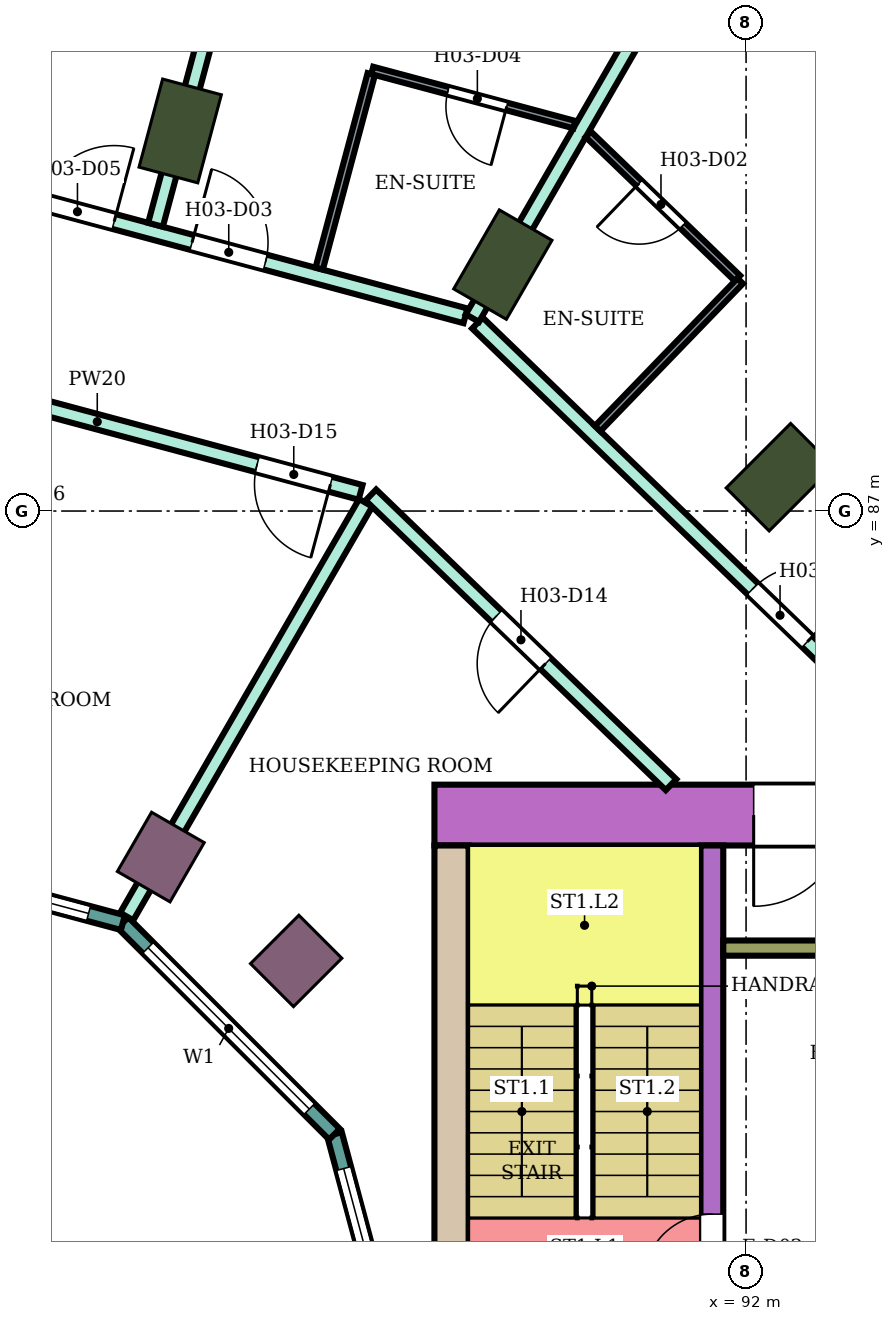
"""IFC4 building model, lengths in metres.
Left out: names, types, materials, properties, quantities, classifications, styles, units other than length and angle.
Written with IfcOpenShell. Run it as: python <this file> out.ifc"""

import sys

from ifc_helpers import new_model, si_unit, direction, frame, frame_2d, origin, origin_2d, place, context, subcontext, project, spatial, rectangle, extrude, element, fill, save


model = new_model("IFC4")
c1 = context("Model", 3, precision=1e-05, world=origin(), true_north=direction((0.0, 1.0)))
c2 = subcontext(c1, "Body", "Model", "MODEL_VIEW")
j1 = project(units=[si_unit("LENGTHUNIT", "METRE"), si_unit("PLANEANGLEUNIT", "RADIAN")], contexts=[c1])
p1 = place(None, origin())
s1 = spatial("IfcSite", under=j1, at=p1, CompositionType="ELEMENT")
p2 = place(p1, origin())
s2 = spatial("IfcBuilding", under=s1, at=p2, CompositionType="ELEMENT")
p3 = place(p2, frame((0.0, 0.0, 51.6)))
s3 = spatial("IfcBuildingStorey", under=s2, at=p3, CompositionType="ELEMENT", Elevation=51.6)
for number, where, z_axis, x_axis in (
    (1, (92.445, 87.445, 0.0), (0.0, 0.0, 1.0), (0.707, 0.707, 0.0)),
    (2, (88.8, 90.242, 0.0), (0.0, 0.0, 1.0), (0.5, 0.866, 0.0)),
    (3, (84.555, 92.0, 0.0), (0.0, 0.0, 1.0), (0.259, 0.966, 0.0)),
):
    element("IfcColumn", number, at=place(p3, frame(where, z_axis=z_axis, x_axis=x_axis)), inside=s3, PredefinedType="COLUMN", context=c2, shape_type="SweptSolid", body=[
        extrude(rectangle(XDim=1.2, YDim=0.8, at=origin_2d()), origin(), (0.0, 0.0, 1.0), 3.8),
    ])
for number, where, z_axis, x_axis in (
    (4, (86.081, 81.081, 0.0), (0.0, 0.0, 1.0), (0.707, 0.707, 0.0)),
    (5, (84.3, 82.448, 0.0), (0.0, 0.0, 1.0), (0.5, 0.866, 0.0)),
):
    element("IfcColumn", number, at=place(p3, frame(where, z_axis=z_axis, x_axis=x_axis)), inside=s3, PredefinedType="COLUMN", context=c2, shape_type="SweptSolid", body=[
        extrude(rectangle(XDim=0.9, YDim=0.8, at=origin_2d()), origin(), (0.0, 0.0, 1.0), 3.8),
    ])
p4 = place(p3, frame((87.9, 83.0, 0.0), z_axis=(0.0, 0.0, 1.0), x_axis=(1.0, 0.0, 0.0)))
e6 = element("IfcWall", 6, at=p4, inside=s3, PredefinedType="SHEAR", context=c2, shape_type="SweptSolid", body=[
    extrude(rectangle(XDim=14.7, YDim=0.8, at=frame_2d((7.35, 0.0))), origin(), (0.0, 0.0, 1.0), 3.48),
])
p5 = place(p4, frame((4.2, 0.0, 0.0)))
e7 = element("IfcOpeningElement", 7, at=p5, cuts=e6, PredefinedType="OPENING", context=c2, shape_type="SweptSolid", body=[
    extrude(rectangle(XDim=2.4, YDim=2.4, at=frame_2d((1.2, 1.2))), frame((0.0, 0.41, 0.0), z_axis=(0.0, -1.0, 0.0), x_axis=(1.0, 0.0, 0.0)), (0.0, 0.0, 1.0), 0.82),
])
p6 = place(p3, frame((88.125, 75.0, 0.0), z_axis=(0.0, 0.0, 1.0), x_axis=(0.0, 1.0, 0.0)))
e8 = element("IfcWall", 8, at=p6, inside=s3, PredefinedType="SHEAR", context=c2, shape_type="SweptSolid", body=[
    extrude(rectangle(XDim=7.6, YDim=0.45, at=frame_2d((3.8, 0.0))), origin(), (0.0, 0.0, 1.0), 3.48),
])
p7 = place(p3, frame((91.55, 75.0, 0.0), z_axis=(0.0, 0.0, 1.0), x_axis=(0.0, 1.0, 0.0)))
e9 = element("IfcWall", 9, at=p7, inside=s3, PredefinedType="SHEAR", context=c2, shape_type="SweptSolid", body=[
    extrude(rectangle(XDim=7.6, YDim=0.3, at=frame_2d((3.8, 0.0))), origin(), (0.0, 0.0, 1.0), 3.48),
])
p8 = place(p7, frame((1.85, 0.0, 0.0)))
e10 = element("IfcOpeningElement", 10, at=p8, cuts=e9, PredefinedType="OPENING", context=c2, shape_type="SweptSolid", body=[
    extrude(rectangle(XDim=0.9, YDim=2.1, at=frame_2d((0.45, 1.05))), frame((0.0, 0.16, 0.0), z_axis=(0.0, -1.0, 0.0), x_axis=(1.0, 0.0, 0.0)), (0.0, 0.0, 1.0), 0.32),
])
p9 = place(p3, frame((91.7, 81.25, 0.0), z_axis=(0.0, 0.0, 1.0), x_axis=(1.0, 0.0, 0.0)))
e11 = element("IfcWall", 11, at=p9, inside=s3, PredefinedType="SHEAR", context=c2, shape_type="SweptSolid", body=[
    extrude(rectangle(XDim=4.65, YDim=0.2, at=frame_2d((2.325, 0.0))), origin(), (0.0, 0.0, 1.0), 3.48),
])
p10 = place(p3, frame((87.604, 75.0, 0.0), z_axis=(0.0, 0.0, 1.0), x_axis=(-0.258789828301, 0.965933654434, 0.0)))
e12 = element("IfcWall", 12, at=p10, inside=s3, PredefinedType="NOTDEFINED", context=c2, shape_type="SweptSolid", body=[
    extrude(rectangle(XDim=3.936, YDim=0.2, at=frame_2d((1.968, 0.0))), origin(), (0.0, 0.0, 1.0), 3.8),
])
p11 = place(p10, frame((0.468, 0.0, 0.9)))
e13 = element("IfcOpeningElement", 13, at=p11, cuts=e12, PredefinedType="OPENING", context=c2, shape_type="SweptSolid", body=[
    extrude(rectangle(XDim=3.0, YDim=2.3, at=frame_2d((1.5, 1.15))), frame((0.0, 0.11, 0.0), z_axis=(0.0, -1.0, 0.0), x_axis=(1.0, 0.0, 0.0)), (0.0, 0.0, 1.0), 0.22),
])
p12 = place(p3, frame((86.585, 78.802, 0.0), z_axis=(0.0, 0.0, 1.0), x_axis=(-0.707106781187, 0.707106781187, 0.0)))
e14 = element("IfcWall", 14, at=p12, inside=s3, PredefinedType="NOTDEFINED", context=c2, shape_type="SweptSolid", body=[
    extrude(rectangle(XDim=3.936, YDim=0.2, at=frame_2d((1.968, 0.0))), origin(), (0.0, 0.0, 1.0), 3.8),
])
p13 = place(p12, frame((0.468, 0.0, 0.9)))
e15 = element("IfcOpeningElement", 15, at=p13, cuts=e14, PredefinedType="OPENING", context=c2, shape_type="SweptSolid", body=[
    extrude(rectangle(XDim=3.0, YDim=2.3, at=frame_2d((1.5, 1.15))), frame((0.0, 0.11, 0.0), z_axis=(0.0, -1.0, 0.0), x_axis=(1.0, 0.0, 0.0)), (0.0, 0.0, 1.0), 0.22),
])
p14 = place(p3, frame((83.802, 81.585, 0.0), z_axis=(0.0, 0.0, 1.0), x_axis=(-0.965933654434, 0.258789828301, 0.0)))
e16 = element("IfcWall", 16, at=p14, inside=s3, PredefinedType="NOTDEFINED", context=c2, shape_type="SweptSolid", body=[
    extrude(rectangle(XDim=3.936, YDim=0.2, at=frame_2d((1.968, 0.0))), origin(), (0.0, 0.0, 1.0), 3.8),
])
p15 = place(p14, frame((0.468, 0.0, 0.9)))
e17 = element("IfcOpeningElement", 17, at=p15, cuts=e16, PredefinedType="OPENING", context=c2, shape_type="SweptSolid", body=[
    extrude(rectangle(XDim=3.0, YDim=2.3, at=frame_2d((1.5, 1.15))), frame((0.0, 0.11, 0.0), z_axis=(0.0, -1.0, 0.0), x_axis=(1.0, 0.0, 0.0)), (0.0, 0.0, 1.0), 0.22),
])
p16 = place(p3, frame((80.0, 89.104, 0.0), z_axis=(0.0, 0.0, 1.0), x_axis=(0.965856548257, -0.259077455964, 0.0)))
e18 = element("IfcWall", 18, at=p16, inside=s3, PredefinedType="PARTITIONING", context=c2, shape_type="SweptSolid", body=[
    extrude(rectangle(XDim=7.173, YDim=0.2, at=frame_2d((3.586, 0.0))), origin(), (0.0, 0.0, 1.0), 3.35),
])
p17 = place(p16, frame((5.763, 0.0, 0.0)))
e19 = element("IfcOpeningElement", 19, at=p17, cuts=e18, PredefinedType="OPENING", context=c2, shape_type="SweptSolid", body=[
    extrude(rectangle(XDim=1.0, YDim=2.1, at=frame_2d((0.5, 1.05))), frame((0.0, 0.11, 0.0), z_axis=(0.0, -1.0, 0.0), x_axis=(1.0, 0.0, 0.0)), (0.0, 0.0, 1.0), 0.22),
])
p18 = place(p3, frame((80.0, 91.797, 0.0), z_axis=(0.0, 0.0, 1.0), x_axis=(0.965857042792, -0.259075612301, 0.0)))
e20 = element("IfcWall", 20, at=p18, inside=s3, PredefinedType="PARTITIONING", context=c2, shape_type="SweptSolid", body=[
    extrude(rectangle(XDim=8.602, YDim=0.2, at=frame_2d((4.301, 0.0))), origin(), (0.0, 0.0, 1.0), 3.35),
])
p19 = place(p18, frame((4.877, 0.0, 0.0)))
e21 = element("IfcOpeningElement", 21, at=p19, cuts=e20, PredefinedType="OPENING", context=c2, shape_type="SweptSolid", body=[
    extrude(rectangle(XDim=1.0, YDim=2.1, at=frame_2d((0.5, 1.05))), frame((0.0, 0.11, 0.0), z_axis=(0.0, -1.0, 0.0), x_axis=(1.0, 0.0, 0.0)), (0.0, 0.0, 1.0), 0.22),
])
p20 = place(p18, frame((2.817, 0.0, 0.0)))
e22 = element("IfcOpeningElement", 22, at=p20, cuts=e20, PredefinedType="OPENING", context=c2, shape_type="SweptSolid", body=[
    extrude(rectangle(XDim=1.0, YDim=2.1, at=frame_2d((0.5, 1.05))), frame((0.0, 0.11, 0.0), z_axis=(0.0, -1.0, 0.0), x_axis=(1.0, 0.0, 0.0)), (0.0, 0.0, 1.0), 0.22),
])
p21 = place(p3, frame((83.851, 81.666, 0.0), z_axis=(0.0, 0.0, 1.0), x_axis=(0.500253653624, 0.865878907259, 0.0)))
e23 = element("IfcWall", 23, at=p21, inside=s3, PredefinedType="PARTITIONING", context=c2, shape_type="SweptSolid", body=[
    extrude(rectangle(XDim=6.285, YDim=0.2, at=frame_2d((3.143, 0.0))), origin(), (0.0, 0.0, 1.0), 3.35),
])
p22 = place(p3, frame((84.23, 90.766, 0.0), z_axis=(0.0, 0.0, 1.0), x_axis=(0.258967920341, 0.965885922992, 0.0)))
e24 = element("IfcWall", 24, at=p22, inside=s3, PredefinedType="PARTITIONING", context=c2, shape_type="SweptSolid", body=[
    extrude(rectangle(XDim=9.475, YDim=0.2, at=frame_2d((4.737, 0.0))), origin(), (0.0, 0.0, 1.0), 3.35),
])
p23 = place(p3, frame((87.064, 87.211, 0.0), z_axis=(0.0, 0.0, 1.0), x_axis=(0.719562412484, -0.694427774891, 0.0)))
e25 = element("IfcWall", 25, at=p23, inside=s3, PredefinedType="PARTITIONING", context=c2, shape_type="SweptSolid", body=[
    extrude(rectangle(XDim=5.488, YDim=0.2, at=frame_2d((2.744, 0.0))), origin(), (0.0, 0.0, 1.0), 3.35),
])
p24 = place(p23, frame((2.294, 0.0, 0.0)))
e26 = element("IfcOpeningElement", 26, at=p24, cuts=e25, PredefinedType="OPENING", context=c2, shape_type="SweptSolid", body=[
    extrude(rectangle(XDim=0.9, YDim=2.1, at=frame_2d((0.45, 1.05))), frame((0.0, 0.11, 0.0), z_axis=(0.0, -1.0, 0.0), x_axis=(1.0, 0.0, 0.0)), (0.0, 0.0, 1.0), 0.22),
])
p25 = place(p3, frame((88.466, 89.473, 0.0), z_axis=(0.0, 0.0, 1.0), x_axis=(0.719346014649, -0.694651935295, 0.0)))
e27 = element("IfcWall", 27, at=p25, inside=s3, PredefinedType="PARTITIONING", context=c2, shape_type="SweptSolid", body=[
    extrude(rectangle(XDim=6.525, YDim=0.2, at=frame_2d((3.263, 0.0))), origin(), (0.0, 0.0, 1.0), 3.35),
])
p26 = place(p25, frame((5.034, 0.0, 0.0)))
e28 = element("IfcOpeningElement", 28, at=p26, cuts=e27, PredefinedType="OPENING", context=c2, shape_type="SweptSolid", body=[
    extrude(rectangle(XDim=1.0, YDim=2.1, at=frame_2d((0.5, 1.05))), frame((0.0, 0.11, 0.0), z_axis=(0.0, -1.0, 0.0), x_axis=(1.0, 0.0, 0.0)), (0.0, 0.0, 1.0), 0.22),
])
p27 = place(p3, frame((88.399, 89.538, 0.0), z_axis=(0.0, 0.0, 1.0), x_axis=(0.500249596464, 0.865881251233, 0.0)))
e29 = element("IfcWall", 29, at=p27, inside=s3, PredefinedType="PARTITIONING", context=c2, shape_type="SweptSolid", body=[
    extrude(rectangle(XDim=9.006, YDim=0.2, at=frame_2d((4.503, 0.0))), origin(), (0.0, 0.0, 1.0), 3.35),
])
p28 = place(p3, frame((86.384, 90.19, 0.0), z_axis=(0.0, 0.0, 1.0), x_axis=(0.258677737588, 0.965963678446, 0.0)))
e30 = element("IfcWall", 30, at=p28, inside=s3, PredefinedType="PARTITIONING", context=c2, shape_type="SweptSolid", body=[
    extrude(rectangle(XDim=2.649, YDim=0.1, at=frame_2d((1.325, 0.0))), origin(), (0.0, 0.0, 1.0), 3.35),
])
p29 = place(p3, frame((87.082, 92.797, 0.0), z_axis=(0.0, 0.0, 1.0), x_axis=(0.965892621415, -0.258942935598, 0.0)))
e31 = element("IfcWall", 31, at=p29, inside=s3, PredefinedType="PARTITIONING", context=c2, shape_type="SweptSolid", body=[
    extrude(rectangle(XDim=2.753, YDim=0.1, at=frame_2d((1.376, 0.0))), origin(), (0.0, 0.0, 1.0), 3.35),
])
p30 = place(p29, frame((1.032, 0.0, 0.0)))
e32 = element("IfcOpeningElement", 32, at=p30, cuts=e31, PredefinedType="OPENING", context=c2, shape_type="SweptSolid", body=[
    extrude(rectangle(XDim=0.8, YDim=2.1, at=frame_2d((0.4, 1.05))), frame((0.0, 0.06, 0.0), z_axis=(0.0, -1.0, 0.0), x_axis=(1.0, 0.0, 0.0)), (0.0, 0.0, 1.0), 0.12),
])
p31 = place(p3, frame((89.925, 91.956, 0.0), z_axis=(0.0, 0.0, 1.0), x_axis=(0.719395291255, -0.694600903339, 0.0)))
e33 = element("IfcWall", 33, at=p31, inside=s3, PredefinedType="PARTITIONING", context=c2, shape_type="SweptSolid", body=[
    extrude(rectangle(XDim=2.728, YDim=0.1, at=frame_2d((1.364, 0.0))), origin(), (0.0, 0.0, 1.0), 3.35),
])
p32 = place(p31, frame((0.928, 0.0, 0.0)))
e34 = element("IfcOpeningElement", 34, at=p32, cuts=e33, PredefinedType="OPENING", context=c2, shape_type="SweptSolid", body=[
    extrude(rectangle(XDim=0.8, YDim=2.1, at=frame_2d((0.4, 1.05))), frame((0.0, 0.06, 0.0), z_axis=(0.0, -1.0, 0.0), x_axis=(1.0, 0.0, 0.0)), (0.0, 0.0, 1.0), 0.12),
])
p33 = place(p3, frame((90.048, 88.085, 0.0), z_axis=(0.0, 0.0, 1.0), x_axis=(0.694655834207, 0.71934224956, 0.0)))
e35 = element("IfcWall", 35, at=p33, inside=s3, PredefinedType="PARTITIONING", context=c2, shape_type="SweptSolid", body=[
    extrude(rectangle(XDim=2.7, YDim=0.1, at=frame_2d((1.35, 0.0))), origin(), (0.0, 0.0, 1.0), 3.35),
])
p34 = place(p11, origin())
e36 = element("IfcWindow", 36, at=p34, inside=s3, PartitioningType="SINGLE_PANEL", PredefinedType="WINDOW", context=c2, shape_type="SweptSolid", body=[
    extrude(rectangle(XDim=3.0, YDim=2.3, at=frame_2d((1.5, 1.15))), frame((0.0, 0.03, 0.0), z_axis=(0.0, -1.0, 0.0), x_axis=(1.0, 0.0, 0.0)), (0.0, 0.0, 1.0), 0.06),
])
fill(e13, e36)
p35 = place(p13, origin())
e37 = element("IfcWindow", 37, at=p35, inside=s3, PartitioningType="SINGLE_PANEL", PredefinedType="WINDOW", context=c2, shape_type="SweptSolid", body=[
    extrude(rectangle(XDim=3.0, YDim=2.3, at=frame_2d((1.5, 1.15))), frame((0.0, 0.03, 0.0), z_axis=(0.0, -1.0, 0.0), x_axis=(1.0, 0.0, 0.0)), (0.0, 0.0, 1.0), 0.06),
])
fill(e15, e37)
p36 = place(p15, origin())
e38 = element("IfcWindow", 38, at=p36, inside=s3, PartitioningType="SINGLE_PANEL", PredefinedType="WINDOW", context=c2, shape_type="SweptSolid", body=[
    extrude(rectangle(XDim=3.0, YDim=2.3, at=frame_2d((1.5, 1.15))), frame((0.0, 0.03, 0.0), z_axis=(0.0, -1.0, 0.0), x_axis=(1.0, 0.0, 0.0)), (0.0, 0.0, 1.0), 0.06),
])
fill(e17, e38)
p37 = place(p26, origin())
e39 = element("IfcDoor", 39, at=p37, inside=s3, OperationType="SINGLE_SWING_RIGHT", PredefinedType="DOOR", context=c2, shape_type="SweptSolid", body=[
    extrude(rectangle(XDim=1.0, YDim=2.1, at=frame_2d((0.5, 1.05))), frame((0.0, 0.025, 0.0), z_axis=(0.0, -1.0, 0.0), x_axis=(1.0, 0.0, 0.0)), (0.0, 0.0, 1.0), 0.05),
])
fill(e28, e39)
p38 = place(p32, frame((0.8, 0.0, 0.0), z_axis=(0.0, 0.0, 1.0), x_axis=(-1.0, 0.0, 0.0)))
e40 = element("IfcDoor", 40, at=p38, inside=s3, OperationType="SINGLE_SWING_RIGHT", PredefinedType="DOOR", context=c2, shape_type="SweptSolid", body=[
    extrude(rectangle(XDim=0.8, YDim=2.1, at=frame_2d((0.4, 1.05))), frame((0.0, 0.025, 0.0), z_axis=(0.0, -1.0, 0.0), x_axis=(1.0, 0.0, 0.0)), (0.0, 0.0, 1.0), 0.05),
])
fill(e34, e40)
p39 = place(p19, origin())
e41 = element("IfcDoor", 41, at=p39, inside=s3, OperationType="SINGLE_SWING_LEFT", PredefinedType="DOOR", context=c2, shape_type="SweptSolid", body=[
    extrude(rectangle(XDim=1.0, YDim=2.1, at=frame_2d((0.5, 1.05))), frame((0.0, 0.025, 0.0), z_axis=(0.0, -1.0, 0.0), x_axis=(1.0, 0.0, 0.0)), (0.0, 0.0, 1.0), 0.05),
])
fill(e21, e41)
p40 = place(p30, frame((0.8, 0.0, 0.0), z_axis=(0.0, 0.0, 1.0), x_axis=(-1.0, 0.0, 0.0)))
e42 = element("IfcDoor", 42, at=p40, inside=s3, OperationType="SINGLE_SWING_LEFT", PredefinedType="DOOR", context=c2, shape_type="SweptSolid", body=[
    extrude(rectangle(XDim=0.8, YDim=2.1, at=frame_2d((0.4, 1.05))), frame((0.0, 0.025, 0.0), z_axis=(0.0, -1.0, 0.0), x_axis=(1.0, 0.0, 0.0)), (0.0, 0.0, 1.0), 0.05),
])
fill(e32, e42)
p41 = place(p20, origin())
e43 = element("IfcDoor", 43, at=p41, inside=s3, OperationType="SINGLE_SWING_RIGHT", PredefinedType="DOOR", context=c2, shape_type="SweptSolid", body=[
    extrude(rectangle(XDim=1.0, YDim=2.1, at=frame_2d((0.5, 1.05))), frame((0.0, 0.025, 0.0), z_axis=(0.0, -1.0, 0.0), x_axis=(1.0, 0.0, 0.0)), (0.0, 0.0, 1.0), 0.05),
])
fill(e22, e43)
p42 = place(p24, frame((0.9, 0.0, 0.0), z_axis=(0.0, 0.0, 1.0), x_axis=(-1.0, 0.0, 0.0)))
e44 = element("IfcDoor", 44, at=p42, inside=s3, OperationType="SINGLE_SWING_LEFT", PredefinedType="DOOR", context=c2, shape_type="SweptSolid", body=[
    extrude(rectangle(XDim=0.9, YDim=2.1, at=frame_2d((0.45, 1.05))), frame((0.0, 0.025, 0.0), z_axis=(0.0, -1.0, 0.0), x_axis=(1.0, 0.0, 0.0)), (0.0, 0.0, 1.0), 0.05),
])
fill(e26, e44)
p43 = place(p17, frame((1.0, 0.0, 0.0), z_axis=(0.0, 0.0, 1.0), x_axis=(-1.0, 0.0, 0.0)))
e45 = element("IfcDoor", 45, at=p43, inside=s3, OperationType="SINGLE_SWING_LEFT", PredefinedType="DOOR", context=c2, shape_type="SweptSolid", body=[
    extrude(rectangle(XDim=1.0, YDim=2.1, at=frame_2d((0.5, 1.05))), frame((0.0, 0.025, 0.0), z_axis=(0.0, -1.0, 0.0), x_axis=(1.0, 0.0, 0.0)), (0.0, 0.0, 1.0), 0.05),
])
fill(e19, e45)
p44 = place(p8, origin())
e46 = element("IfcDoor", 46, at=p44, inside=s3, OperationType="SINGLE_SWING_LEFT", PredefinedType="DOOR", context=c2, shape_type="SweptSolid", body=[
    extrude(rectangle(XDim=0.9, YDim=2.1, at=frame_2d((0.45, 1.05))), frame((0.0, 0.025, 0.0), z_axis=(0.0, -1.0, 0.0), x_axis=(1.0, 0.0, 0.0)), (0.0, 0.0, 1.0), 0.05),
])
fill(e10, e46)
p45 = place(p5, frame((2.4, 0.0, 0.0), z_axis=(0.0, 0.0, 1.0), x_axis=(-1.0, 0.0, 0.0)))
e47 = element("IfcDoor", 47, at=p45, inside=s3, OperationType="DOUBLE_DOOR_SINGLE_SWING", PredefinedType="DOOR", context=c2, shape_type="SweptSolid", body=[
    extrude(rectangle(XDim=2.4, YDim=2.4, at=frame_2d((1.2, 1.2))), frame((0.0, 0.025, 0.0), z_axis=(0.0, -1.0, 0.0), x_axis=(1.0, 0.0, 0.0)), (0.0, 0.0, 1.0), 0.05),
])
fill(e7, e47)
save(model, sys.argv[1])
